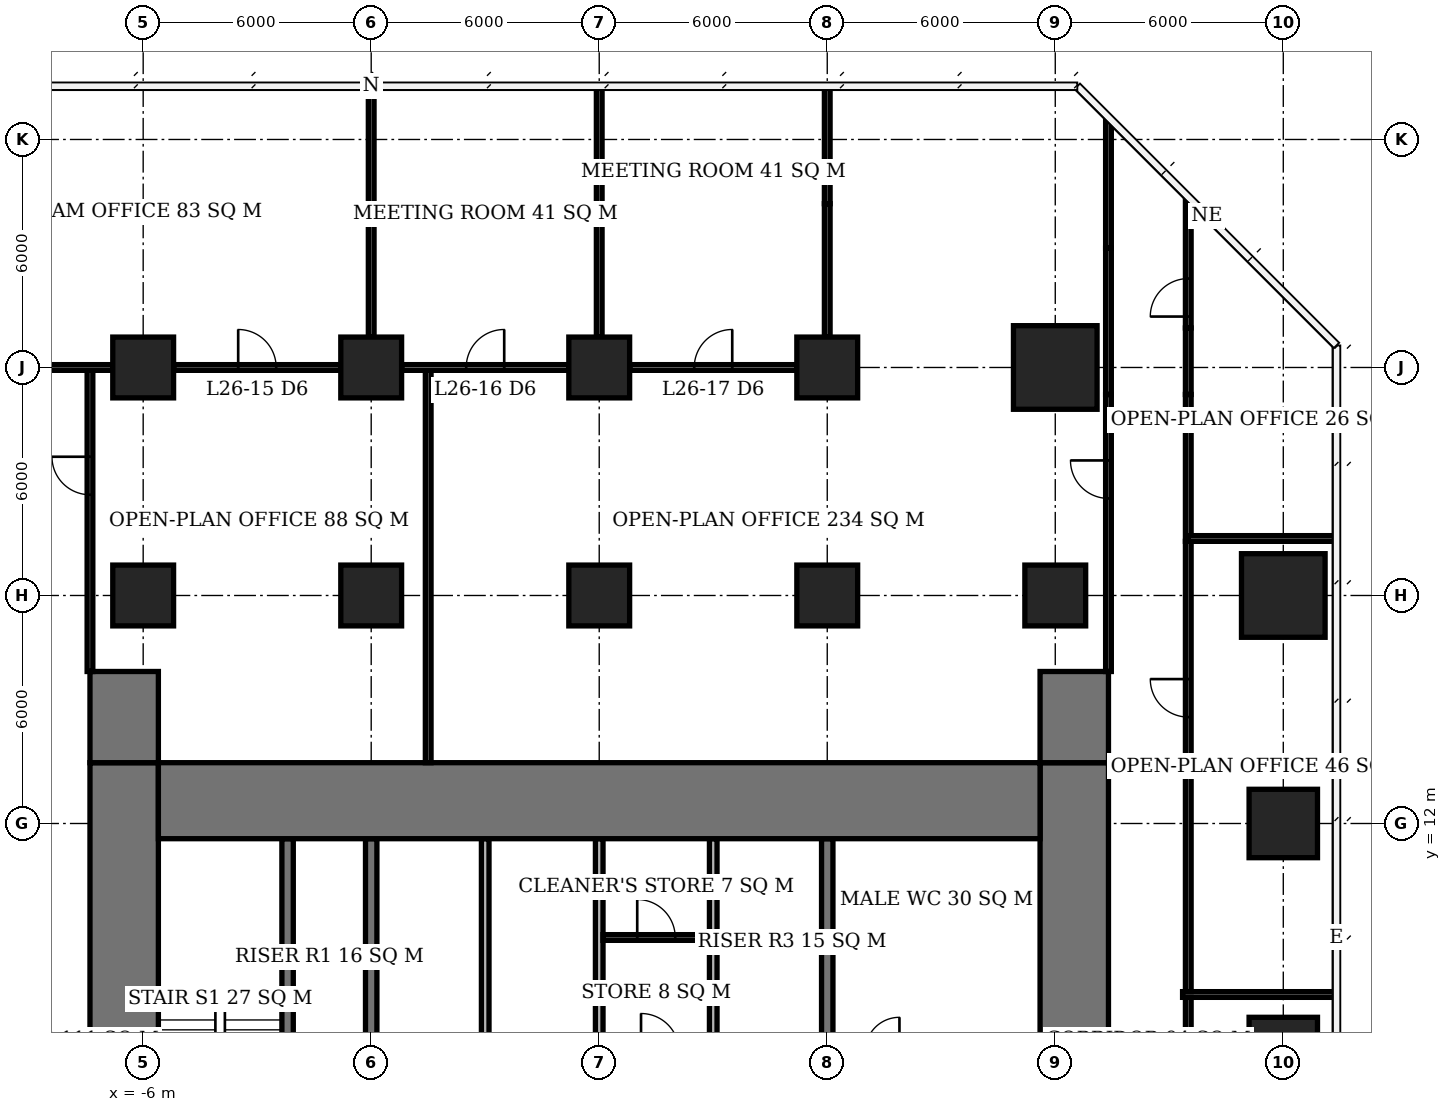
"""IFC4 building model, lengths in metres.
Left out: names, types, materials, properties, quantities, classifications, styles, units other than length and angle.
Written with IfcOpenShell. Run it as: python <this file> out.ifc"""

import sys

from ifc_helpers import new_model, si_unit, direction, frame, frame_2d, origin, origin_2d, place, context, subcontext, project, spatial, rectangle, extrude, element, fill, save


model = new_model("IFC4")
c1 = context("Model", 3, precision=1e-05, world=origin(), true_north=direction((0.0, 1.0)))
c2 = subcontext(c1, "Body", "Model", "MODEL_VIEW")
j1 = project(units=[si_unit("LENGTHUNIT", "METRE"), si_unit("PLANEANGLEUNIT", "RADIAN")], contexts=[c1])
p1 = place(None, origin())
s1 = spatial("IfcSite", under=j1, at=p1, CompositionType="ELEMENT")
p2 = place(p1, origin())
s2 = spatial("IfcBuilding", under=s1, at=p2, CompositionType="ELEMENT")
p3 = place(p2, frame((0.0, 0.0, 109.4)))
s3 = spatial("IfcBuildingStorey", under=s2, at=p3, CompositionType="ELEMENT", Elevation=109.4)
for number, where, z_axis, x_axis in (
    (1, (-6.0, 18.0, 0.0), (0.0, 0.0, 1.0), (1.0, 0.0, 0.0)),
    (2, (-6.0, 24.0, 0.0), (0.0, 0.0, 1.0), (1.0, 0.0, 0.0)),
    (3, (0.0, 18.0, 0.0), (0.0, 0.0, 1.0), (1.0, 0.0, 0.0)),
    (4, (0.0, 24.0, 0.0), (0.0, 0.0, 1.0), (1.0, 0.0, 0.0)),
    (5, (6.0, 18.0, 0.0), (0.0, 0.0, 1.0), (1.0, 0.0, 0.0)),
    (6, (6.0, 24.0, 0.0), (0.0, 0.0, 1.0), (1.0, 0.0, 0.0)),
    (7, (12.0, 18.0, 0.0), (0.0, 0.0, 1.0), (1.0, 0.0, 0.0)),
    (8, (12.0, 24.0, 0.0), (0.0, 0.0, 1.0), (1.0, 0.0, 0.0)),
    (9, (18.0, 18.0, 0.0), (0.0, 0.0, 1.0), (1.0, 0.0, 0.0)),
):
    element("IfcColumn", number, at=place(p3, frame(where, z_axis=z_axis, x_axis=x_axis)), inside=s3, PredefinedType="COLUMN", context=c2, shape_type="SweptSolid", body=[
        extrude(rectangle(XDim=1.6, YDim=1.6, at=origin_2d()), origin(), (0.0, 0.0, 1.0), 3.9),
    ])
p4 = place(p3, frame((18.0, 24.0, 0.0), z_axis=(0.0, 0.0, 1.0), x_axis=(1.0, 0.0, 0.0)))
e10 = element("IfcColumn", 10, at=p4, inside=s3, PredefinedType="COLUMN", context=c2, shape_type="SweptSolid", body=[
    extrude(rectangle(XDim=2.2, YDim=2.2, at=origin_2d()), origin(), (0.0, 0.0, 1.0), 3.9),
])
for number, where, z_axis, x_axis in (
    (11, (24.0, 6.0, 0.0), (0.0, 0.0, 1.0), (1.0, 0.0, 0.0)),
    (12, (24.0, 12.0, 0.0), (0.0, 0.0, 1.0), (1.0, 0.0, 0.0)),
):
    element("IfcColumn", number, at=place(p3, frame(where, z_axis=z_axis, x_axis=x_axis)), inside=s3, PredefinedType="COLUMN", context=c2, shape_type="SweptSolid", body=[
        extrude(rectangle(XDim=1.8, YDim=1.8, at=origin_2d()), origin(), (0.0, 0.0, 1.0), 3.9),
    ])
p5 = place(p3, frame((24.0, 18.0, 0.0), z_axis=(0.0, 0.0, 1.0), x_axis=(1.0, 0.0, 0.0)))
e13 = element("IfcColumn", 13, at=p5, inside=s3, PredefinedType="COLUMN", context=c2, shape_type="SweptSolid", body=[
    extrude(rectangle(XDim=2.2, YDim=2.2, at=origin_2d()), origin(), (0.0, 0.0, 1.0), 3.9),
])
p6 = place(p3, frame((-5.6, 12.6, 0.0), z_axis=(0.0, 0.0, 1.0), x_axis=(1.0, 0.0, 0.0)))
e14 = element("IfcWall", 14, at=p6, inside=s3, PredefinedType="SHEAR", context=c2, shape_type="SweptSolid", body=[
    extrude(rectangle(XDim=23.2, YDim=2.0, at=frame_2d((11.6, 0.0))), origin(), (0.0, 0.0, 1.0), 3.9),
])
p7 = place(p3, frame((-6.5, -7.6, 0.0), z_axis=(0.0, 0.0, 1.0), x_axis=(0.0, 1.0, 0.0)))
e15 = element("IfcWall", 15, at=p7, inside=s3, PredefinedType="SHEAR", context=c2, shape_type="SweptSolid", body=[
    extrude(rectangle(XDim=21.2, YDim=1.8, at=frame_2d((10.6, 0.0))), origin(), (0.0, 0.0, 1.0), 3.9),
])
p8 = place(p7, frame((7.8, 0.0, 0.0)))
e16 = element("IfcOpeningElement", 16, at=p8, cuts=e15, PredefinedType="OPENING", context=c2, shape_type="SweptSolid", body=[
    extrude(rectangle(XDim=1.8, YDim=2.4, at=frame_2d((0.9, 1.2))), frame((0.0, 0.91, 0.0), z_axis=(0.0, -1.0, 0.0), x_axis=(1.0, 0.0, 0.0)), (0.0, 0.0, 1.0), 1.82),
])
p9 = place(p3, frame((18.5, -7.6, 0.0), z_axis=(0.0, 0.0, 1.0), x_axis=(0.0, 1.0, 0.0)))
e17 = element("IfcWall", 17, at=p9, inside=s3, PredefinedType="SHEAR", context=c2, shape_type="SweptSolid", body=[
    extrude(rectangle(XDim=21.2, YDim=1.8, at=frame_2d((10.6, 0.0))), origin(), (0.0, 0.0, 1.0), 3.9),
])
p10 = place(p9, frame((9.2, 0.0, 0.0)))
e18 = element("IfcOpeningElement", 18, at=p10, cuts=e17, PredefinedType="OPENING", context=c2, shape_type="SweptSolid", body=[
    extrude(rectangle(XDim=1.8, YDim=2.4, at=frame_2d((0.9, 1.2))), frame((0.0, 0.91, 0.0), z_axis=(0.0, -1.0, 0.0), x_axis=(1.0, 0.0, 0.0)), (0.0, 0.0, 1.0), 1.82),
])
for number, where, z_axis, x_axis in (
    (19, (-6.5, 13.6, 0.0), (0.0, 0.0, 1.0), (0.0, 1.0, 0.0)),
    (20, (18.5, 13.6, 0.0), (0.0, 0.0, 1.0), (0.0, 1.0, 0.0)),
):
    element("IfcWall", number, at=place(p3, frame(where, z_axis=z_axis, x_axis=x_axis)), inside=s3, PredefinedType="SHEAR", context=c2, shape_type="SweptSolid", body=[
        extrude(rectangle(XDim=2.4, YDim=1.8, at=frame_2d((1.2, 0.0))), origin(), (0.0, 0.0, 1.0), 3.9),
    ])
p11 = place(p3, frame((0.0, 3.15, 0.0), z_axis=(0.0, 0.0, 1.0), x_axis=(0.0, 1.0, 0.0)))
e21 = element("IfcWall", 21, at=p11, inside=s3, PredefinedType="SHEAR", context=c2, shape_type="SweptSolid", body=[
    extrude(rectangle(XDim=8.45, YDim=0.3, at=frame_2d((4.225, 0.0))), origin(), (0.0, 0.0, 1.0), 3.9),
])
p12 = place(p3, frame((12.0, 6.15, 0.0), z_axis=(0.0, 0.0, 1.0), x_axis=(0.0, 1.0, 0.0)))
e22 = element("IfcWall", 22, at=p12, inside=s3, PredefinedType="SHEAR", context=c2, shape_type="SweptSolid", body=[
    extrude(rectangle(XDim=5.45, YDim=0.3, at=frame_2d((2.725, 0.0))), origin(), (0.0, 0.0, 1.0), 3.9),
])
p13 = place(p3, frame((-2.2, 3.15, 0.0), z_axis=(0.0, 0.0, 1.0), x_axis=(0.0, 1.0, 0.0)))
e23 = element("IfcWall", 23, at=p13, inside=s3, PredefinedType="SHEAR", context=c2, shape_type="SweptSolid", body=[
    extrude(rectangle(XDim=8.45, YDim=0.3, at=frame_2d((4.225, 0.0))), origin(), (0.0, 0.0, 1.0), 3.9),
])
for number, where, z_axis, x_axis in (
    (24, (3.0, 6.15, 0.0), (0.0, 0.0, 1.0), (0.0, 1.0, 0.0)),
    (25, (6.0, 6.15, 0.0), (0.0, 0.0, 1.0), (0.0, 1.0, 0.0)),
    (26, (9.0, 6.15, 0.0), (0.0, 0.0, 1.0), (0.0, 1.0, 0.0)),
):
    element("IfcWall", number, at=place(p3, frame(where, z_axis=z_axis, x_axis=x_axis)), inside=s3, PredefinedType="SOLIDWALL", context=c2, shape_type="SweptSolid", body=[
        extrude(rectangle(XDim=5.45, YDim=0.2, at=frame_2d((2.725, 0.0))), origin(), (0.0, 0.0, 1.0), 3.9),
    ])
p14 = place(p3, frame((6.1, 9.0, 0.0), z_axis=(0.0, 0.0, 1.0), x_axis=(1.0, 0.0, 0.0)))
e27 = element("IfcWall", 27, at=p14, inside=s3, PredefinedType="PARTITIONING", context=c2, shape_type="SweptSolid", body=[
    extrude(rectangle(XDim=2.8, YDim=0.15, at=frame_2d((1.4, 0.0))), origin(), (0.0, 0.0, 1.0), 3.65),
])
p15 = place(p14, frame((0.9, 0.0, 0.0)))
e28 = element("IfcOpeningElement", 28, at=p15, cuts=e27, PredefinedType="OPENING", context=c2, shape_type="SweptSolid", body=[
    extrude(rectangle(XDim=1.0, YDim=2.1, at=frame_2d((0.5, 1.05))), frame((0.0, 0.085, 0.0), z_axis=(0.0, -1.0, 0.0), x_axis=(1.0, 0.0, 0.0)), (0.0, 0.0, 1.0), 0.17),
])
p16 = place(p3, frame((-11.1, 24.0, 0.0), z_axis=(0.0, 0.0, 1.0), x_axis=(1.0, 0.0, 0.0)))
e29 = element("IfcWall", 29, at=p16, inside=s3, PredefinedType="PARTITIONING", context=c2, shape_type="SweptSolid", body=[
    extrude(rectangle(XDim=4.3, YDim=0.15, at=frame_2d((2.15, 0.0))), origin(), (0.0, 0.0, 1.0), 3.65),
])
p17 = place(p3, frame((-5.2, 24.0, 0.0), z_axis=(0.0, 0.0, 1.0), x_axis=(1.0, 0.0, 0.0)))
e30 = element("IfcWall", 30, at=p17, inside=s3, PredefinedType="PARTITIONING", context=c2, shape_type="SweptSolid", body=[
    extrude(rectangle(XDim=4.4, YDim=0.15, at=frame_2d((2.2, 0.0))), origin(), (0.0, 0.0, 1.0), 3.65),
])
p18 = place(p17, frame((1.7, 0.0, 0.0)))
e31 = element("IfcOpeningElement", 31, at=p18, cuts=e30, PredefinedType="OPENING", context=c2, shape_type="SweptSolid", body=[
    extrude(rectangle(XDim=1.0, YDim=2.1, at=frame_2d((0.5, 1.05))), frame((0.0, 0.085, 0.0), z_axis=(0.0, -1.0, 0.0), x_axis=(1.0, 0.0, 0.0)), (0.0, 0.0, 1.0), 0.17),
])
p19 = place(p3, frame((0.8, 24.0, 0.0), z_axis=(0.0, 0.0, 1.0), x_axis=(1.0, 0.0, 0.0)))
e32 = element("IfcWall", 32, at=p19, inside=s3, PredefinedType="PARTITIONING", context=c2, shape_type="SweptSolid", body=[
    extrude(rectangle(XDim=4.4, YDim=0.15, at=frame_2d((2.2, 0.0))), origin(), (0.0, 0.0, 1.0), 3.65),
])
p20 = place(p19, frame((1.7, 0.0, 0.0)))
e33 = element("IfcOpeningElement", 33, at=p20, cuts=e32, PredefinedType="OPENING", context=c2, shape_type="SweptSolid", body=[
    extrude(rectangle(XDim=1.0, YDim=2.1, at=frame_2d((0.5, 1.05))), frame((0.0, 0.085, 0.0), z_axis=(0.0, -1.0, 0.0), x_axis=(1.0, 0.0, 0.0)), (0.0, 0.0, 1.0), 0.17),
])
p21 = place(p3, frame((6.8, 24.0, 0.0), z_axis=(0.0, 0.0, 1.0), x_axis=(1.0, 0.0, 0.0)))
e34 = element("IfcWall", 34, at=p21, inside=s3, PredefinedType="PARTITIONING", context=c2, shape_type="SweptSolid", body=[
    extrude(rectangle(XDim=4.4, YDim=0.15, at=frame_2d((2.2, 0.0))), origin(), (0.0, 0.0, 1.0), 3.65),
])
p22 = place(p21, frame((1.7, 0.0, 0.0)))
e35 = element("IfcOpeningElement", 35, at=p22, cuts=e34, PredefinedType="OPENING", context=c2, shape_type="SweptSolid", body=[
    extrude(rectangle(XDim=1.0, YDim=2.1, at=frame_2d((0.5, 1.05))), frame((0.0, 0.085, 0.0), z_axis=(0.0, -1.0, 0.0), x_axis=(1.0, 0.0, 0.0)), (0.0, 0.0, 1.0), 0.17),
])
p23 = place(p3, frame((0.0, 24.8, 0.0), z_axis=(0.0, 0.0, 1.0), x_axis=(0.0, 1.0, 0.0)))
e36 = element("IfcWall", 36, at=p23, inside=s3, PredefinedType="PARTITIONING", context=c2, shape_type="SweptSolid", body=[
    extrude(rectangle(XDim=3.51, YDim=0.15, at=frame_2d((1.755, 0.0))), origin(), (0.0, 0.0, 1.0), 2.65),
])
p24 = place(p3, frame((0.0, 28.31, 0.0), z_axis=(0.0, 0.0, 1.0), x_axis=(0.0, 1.0, 0.0)))
e37 = element("IfcWall", 37, at=p24, inside=s3, PredefinedType="PARTITIONING", context=c2, shape_type="SweptSolid", body=[
    extrude(rectangle(XDim=3.04, YDim=0.15, at=frame_2d((1.52, 0.0))), origin(), (0.0, 0.0, 1.0), 3.65),
])
p25 = place(p3, frame((6.0, 24.8, 0.0), z_axis=(0.0, 0.0, 1.0), x_axis=(0.0, 1.0, 0.0)))
e38 = element("IfcWall", 38, at=p25, inside=s3, PredefinedType="PARTITIONING", context=c2, shape_type="SweptSolid", body=[
    extrude(rectangle(XDim=3.51, YDim=0.15, at=frame_2d((1.755, 0.0))), origin(), (0.0, 0.0, 1.0), 2.65),
])
p26 = place(p3, frame((6.0, 28.31, 0.0), z_axis=(0.0, 0.0, 1.0), x_axis=(0.0, 1.0, 0.0)))
e39 = element("IfcWall", 39, at=p26, inside=s3, PredefinedType="PARTITIONING", context=c2, shape_type="SweptSolid", body=[
    extrude(rectangle(XDim=3.09, YDim=0.15, at=frame_2d((1.545, 0.0))), origin(), (0.0, 0.0, 1.0), 3.65),
])
p27 = place(p3, frame((12.0, 24.8, 0.0), z_axis=(0.0, 0.0, 1.0), x_axis=(0.0, 1.0, 0.0)))
e40 = element("IfcWall", 40, at=p27, inside=s3, PredefinedType="PARTITIONING", context=c2, shape_type="SweptSolid", body=[
    extrude(rectangle(XDim=3.51, YDim=0.15, at=frame_2d((1.755, 0.0))), origin(), (0.0, 0.0, 1.0), 2.65),
])
p28 = place(p3, frame((12.0, 28.31, 0.0), z_axis=(0.0, 0.0, 1.0), x_axis=(0.0, 1.0, 0.0)))
e41 = element("IfcWall", 41, at=p28, inside=s3, PredefinedType="PARTITIONING", context=c2, shape_type="SweptSolid", body=[
    extrude(rectangle(XDim=3.09, YDim=0.15, at=frame_2d((1.545, 0.0))), origin(), (0.0, 0.0, 1.0), 3.65),
])
p29 = place(p3, frame((-7.4, 16.0, 0.0), z_axis=(0.0, 0.0, 1.0), x_axis=(0.0, 1.0, 0.0)))
e42 = element("IfcWall", 42, at=p29, inside=s3, PredefinedType="PARTITIONING", context=c2, shape_type="SweptSolid", body=[
    extrude(rectangle(XDim=7.925, YDim=0.15, at=frame_2d((3.962, 0.0))), origin(), (0.0, 0.0, 1.0), 3.65),
])
p30 = place(p29, frame((4.651, 0.0, 0.0)))
e43 = element("IfcOpeningElement", 43, at=p30, cuts=e42, PredefinedType="OPENING", context=c2, shape_type="SweptSolid", body=[
    extrude(rectangle(XDim=1.0, YDim=2.1, at=frame_2d((0.5, 1.05))), frame((0.0, 0.085, 0.0), z_axis=(0.0, -1.0, 0.0), x_axis=(1.0, 0.0, 0.0)), (0.0, 0.0, 1.0), 0.17),
])
p31 = place(p3, frame((1.5, 13.6, 0.0), z_axis=(0.0, 0.0, 1.0), x_axis=(0.0, 1.0, 0.0)))
e44 = element("IfcWall", 44, at=p31, inside=s3, PredefinedType="PARTITIONING", context=c2, shape_type="SweptSolid", body=[
    extrude(rectangle(XDim=10.325, YDim=0.15, at=frame_2d((5.163, 0.0))), origin(), (0.0, 0.0, 1.0), 3.65),
])
p32 = place(p3, frame((19.4, 16.0, 0.0), z_axis=(0.0, 0.0, 1.0), x_axis=(0.0, 1.0, 0.0)))
e45 = element("IfcWall", 45, at=p32, inside=s3, PredefinedType="PARTITIONING", context=c2, shape_type="SweptSolid", body=[
    extrude(rectangle(XDim=7.29, YDim=0.15, at=frame_2d((3.645, 0.0))), origin(), (0.0, 0.0, 1.0), 3.65),
])
p33 = place(p32, frame((4.554, 0.0, 0.0)))
e46 = element("IfcOpeningElement", 46, at=p33, cuts=e45, PredefinedType="OPENING", context=c2, shape_type="SweptSolid", body=[
    extrude(rectangle(XDim=1.0, YDim=2.1, at=frame_2d((0.5, 1.05))), frame((0.0, 0.085, 0.0), z_axis=(0.0, -1.0, 0.0), x_axis=(1.0, 0.0, 0.0)), (0.0, 0.0, 1.0), 0.17),
])
p34 = place(p3, frame((19.4, 23.29, 0.0), z_axis=(0.0, 0.0, 1.0), x_axis=(0.0, 1.0, 0.0)))
e47 = element("IfcWall", 47, at=p34, inside=s3, PredefinedType="PARTITIONING", context=c2, shape_type="SweptSolid", body=[
    extrude(rectangle(XDim=3.85, YDim=0.15, at=frame_2d((1.925, 0.0))), origin(), (0.0, 0.0, 1.0), 2.65),
])
p35 = place(p3, frame((19.4, 27.14, 0.0), z_axis=(0.0, 0.0, 1.0), x_axis=(0.0, 1.0, 0.0)))
e48 = element("IfcWall", 48, at=p35, inside=s3, PredefinedType="PARTITIONING", context=c2, shape_type="SweptSolid", body=[
    extrude(rectangle(XDim=3.349, YDim=0.15, at=frame_2d((1.675, 0.0))), origin(), (0.0, 0.0, 1.0), 3.65),
])
p36 = place(p3, frame((21.5, -0.9, 0.0), z_axis=(0.0, 0.0, 1.0), x_axis=(0.0, 1.0, 0.0)))
e49 = element("IfcWall", 49, at=p36, inside=s3, PredefinedType="PARTITIONING", context=c2, shape_type="SweptSolid", body=[
    extrude(rectangle(XDim=8.325, YDim=0.15, at=frame_2d((4.163, 0.0))), origin(), (0.0, 0.0, 1.0), 3.65),
])
p37 = place(p36, frame((4.934, 0.0, 0.0)))
e50 = element("IfcOpeningElement", 50, at=p37, cuts=e49, PredefinedType="OPENING", context=c2, shape_type="SweptSolid", body=[
    extrude(rectangle(XDim=1.0, YDim=2.1, at=frame_2d((0.5, 1.05))), frame((0.0, 0.085, 0.0), z_axis=(0.0, -1.0, 0.0), x_axis=(1.0, 0.0, 0.0)), (0.0, 0.0, 1.0), 0.17),
])
p38 = place(p3, frame((21.5, 7.575, 0.0), z_axis=(0.0, 0.0, 1.0), x_axis=(0.0, 1.0, 0.0)))
e51 = element("IfcWall", 51, at=p38, inside=s3, PredefinedType="PARTITIONING", context=c2, shape_type="SweptSolid", body=[
    extrude(rectangle(XDim=11.85, YDim=0.15, at=frame_2d((5.925, 0.0))), origin(), (0.0, 0.0, 1.0), 3.65),
])
p39 = place(p38, frame((7.225, 0.0, 0.0)))
e52 = element("IfcOpeningElement", 52, at=p39, cuts=e51, PredefinedType="OPENING", context=c2, shape_type="SweptSolid", body=[
    extrude(rectangle(XDim=1.0, YDim=2.1, at=frame_2d((0.5, 1.05))), frame((0.0, 0.085, 0.0), z_axis=(0.0, -1.0, 0.0), x_axis=(1.0, 0.0, 0.0)), (0.0, 0.0, 1.0), 0.17),
])
p40 = place(p3, frame((21.35, 7.5, 0.0), z_axis=(0.0, 0.0, 1.0), x_axis=(1.0, 0.0, 0.0)))
e53 = element("IfcWall", 53, at=p40, inside=s3, PredefinedType="PARTITIONING", context=c2, shape_type="SweptSolid", body=[
    extrude(rectangle(XDim=4.05, YDim=0.15, at=frame_2d((2.025, 0.0))), origin(), (0.0, 0.0, 1.0), 3.65),
])
p41 = place(p3, frame((21.5, 19.425, 0.0), z_axis=(0.0, 0.0, 1.0), x_axis=(0.0, 1.0, 0.0)))
e54 = element("IfcWall", 54, at=p41, inside=s3, PredefinedType="PARTITIONING", context=c2, shape_type="SweptSolid", body=[
    extrude(rectangle(XDim=3.865, YDim=0.15, at=frame_2d((1.933, 0.0))), origin(), (0.0, 0.0, 1.0), 3.65),
])
p42 = place(p3, frame((21.5, 23.29, 0.0), z_axis=(0.0, 0.0, 1.0), x_axis=(0.0, 1.0, 0.0)))
e55 = element("IfcWall", 55, at=p42, inside=s3, PredefinedType="PARTITIONING", context=c2, shape_type="SweptSolid", body=[
    extrude(rectangle(XDim=1.75, YDim=0.15, at=frame_2d((0.875, 0.0))), origin(), (0.0, 0.0, 1.0), 2.65),
])
p43 = place(p3, frame((21.5, 25.04, 0.0), z_axis=(0.0, 0.0, 1.0), x_axis=(0.0, 1.0, 0.0)))
e56 = element("IfcWall", 56, at=p43, inside=s3, PredefinedType="PARTITIONING", context=c2, shape_type="SweptSolid", body=[
    extrude(rectangle(XDim=3.348, YDim=0.15, at=frame_2d((1.674, 0.0))), origin(), (0.0, 0.0, 1.0), 3.65),
])
p44 = place(p43, frame((0.3, 0.0, 0.0)))
e57 = element("IfcOpeningElement", 57, at=p44, cuts=e56, PredefinedType="OPENING", context=c2, shape_type="SweptSolid", body=[
    extrude(rectangle(XDim=1.0, YDim=2.1, at=frame_2d((0.5, 1.05))), frame((0.0, 0.085, 0.0), z_axis=(0.0, -1.0, 0.0), x_axis=(1.0, 0.0, 0.0)), (0.0, 0.0, 1.0), 0.17),
])
p45 = place(p3, frame((21.5, 19.5, 0.0), z_axis=(0.0, 0.0, 1.0), x_axis=(1.0, 0.0, 0.0)))
e58 = element("IfcWall", 58, at=p45, inside=s3, PredefinedType="PARTITIONING", context=c2, shape_type="SweptSolid", body=[
    extrude(rectangle(XDim=3.9, YDim=0.15, at=frame_2d((1.95, 0.0))), origin(), (0.0, 0.0, 1.0), 3.65),
])
p46 = place(p15, origin())
e59 = element("IfcDoor", 59, at=p46, inside=s3, OperationType="SINGLE_SWING_LEFT", PredefinedType="DOOR", context=c2, shape_type="SweptSolid", body=[
    extrude(rectangle(XDim=1.0, YDim=2.1, at=frame_2d((0.5, 1.05))), frame((0.0, 0.025, 0.0), z_axis=(0.0, -1.0, 0.0), x_axis=(1.0, 0.0, 0.0)), (0.0, 0.0, 1.0), 0.05),
])
fill(e28, e59)
p47 = place(p18, origin())
e60 = element("IfcDoor", 60, at=p47, inside=s3, OperationType="SINGLE_SWING_LEFT", PredefinedType="DOOR", context=c2, shape_type="SweptSolid", body=[
    extrude(rectangle(XDim=1.0, YDim=2.1, at=frame_2d((0.5, 1.05))), frame((0.0, 0.025, 0.0), z_axis=(0.0, -1.0, 0.0), x_axis=(1.0, 0.0, 0.0)), (0.0, 0.0, 1.0), 0.05),
])
fill(e31, e60)
p48 = place(p20, origin())
e61 = element("IfcDoor", 61, at=p48, inside=s3, OperationType="SINGLE_SWING_RIGHT", PredefinedType="DOOR", context=c2, shape_type="SweptSolid", body=[
    extrude(rectangle(XDim=1.0, YDim=2.1, at=frame_2d((0.5, 1.05))), frame((0.0, 0.025, 0.0), z_axis=(0.0, -1.0, 0.0), x_axis=(1.0, 0.0, 0.0)), (0.0, 0.0, 1.0), 0.05),
])
fill(e33, e61)
p49 = place(p22, origin())
e62 = element("IfcDoor", 62, at=p49, inside=s3, OperationType="SINGLE_SWING_RIGHT", PredefinedType="DOOR", context=c2, shape_type="SweptSolid", body=[
    extrude(rectangle(XDim=1.0, YDim=2.1, at=frame_2d((0.5, 1.05))), frame((0.0, 0.025, 0.0), z_axis=(0.0, -1.0, 0.0), x_axis=(1.0, 0.0, 0.0)), (0.0, 0.0, 1.0), 0.05),
])
fill(e35, e62)
p50 = place(p39, origin())
e63 = element("IfcDoor", 63, at=p50, inside=s3, OperationType="SINGLE_SWING_RIGHT", PredefinedType="DOOR", context=c2, shape_type="SweptSolid", body=[
    extrude(rectangle(XDim=1.0, YDim=2.1, at=frame_2d((0.5, 1.05))), frame((0.0, 0.025, 0.0), z_axis=(0.0, -1.0, 0.0), x_axis=(1.0, 0.0, 0.0)), (0.0, 0.0, 1.0), 0.05),
])
fill(e52, e63)
p51 = place(p30, origin())
e64 = element("IfcDoor", 64, at=p51, inside=s3, OperationType="SINGLE_SWING_RIGHT", PredefinedType="DOOR", context=c2, shape_type="SweptSolid", body=[
    extrude(rectangle(XDim=1.0, YDim=2.1, at=frame_2d((0.5, 1.05))), frame((0.0, 0.025, 0.0), z_axis=(0.0, -1.0, 0.0), x_axis=(1.0, 0.0, 0.0)), (0.0, 0.0, 1.0), 0.05),
])
fill(e43, e64)
p52 = place(p33, origin())
e65 = element("IfcDoor", 65, at=p52, inside=s3, OperationType="SINGLE_SWING_RIGHT", PredefinedType="DOOR", context=c2, shape_type="SweptSolid", body=[
    extrude(rectangle(XDim=1.0, YDim=2.1, at=frame_2d((0.5, 1.05))), frame((0.0, 0.025, 0.0), z_axis=(0.0, -1.0, 0.0), x_axis=(1.0, 0.0, 0.0)), (0.0, 0.0, 1.0), 0.05),
])
fill(e46, e65)
p53 = place(p44, origin())
e66 = element("IfcDoor", 66, at=p53, inside=s3, OperationType="SINGLE_SWING_LEFT", PredefinedType="DOOR", context=c2, shape_type="SweptSolid", body=[
    extrude(rectangle(XDim=1.0, YDim=2.1, at=frame_2d((0.5, 1.05))), frame((0.0, 0.025, 0.0), z_axis=(0.0, -1.0, 0.0), x_axis=(1.0, 0.0, 0.0)), (0.0, 0.0, 1.0), 0.05),
])
fill(e57, e66)
save(model, sys.argv[1])
